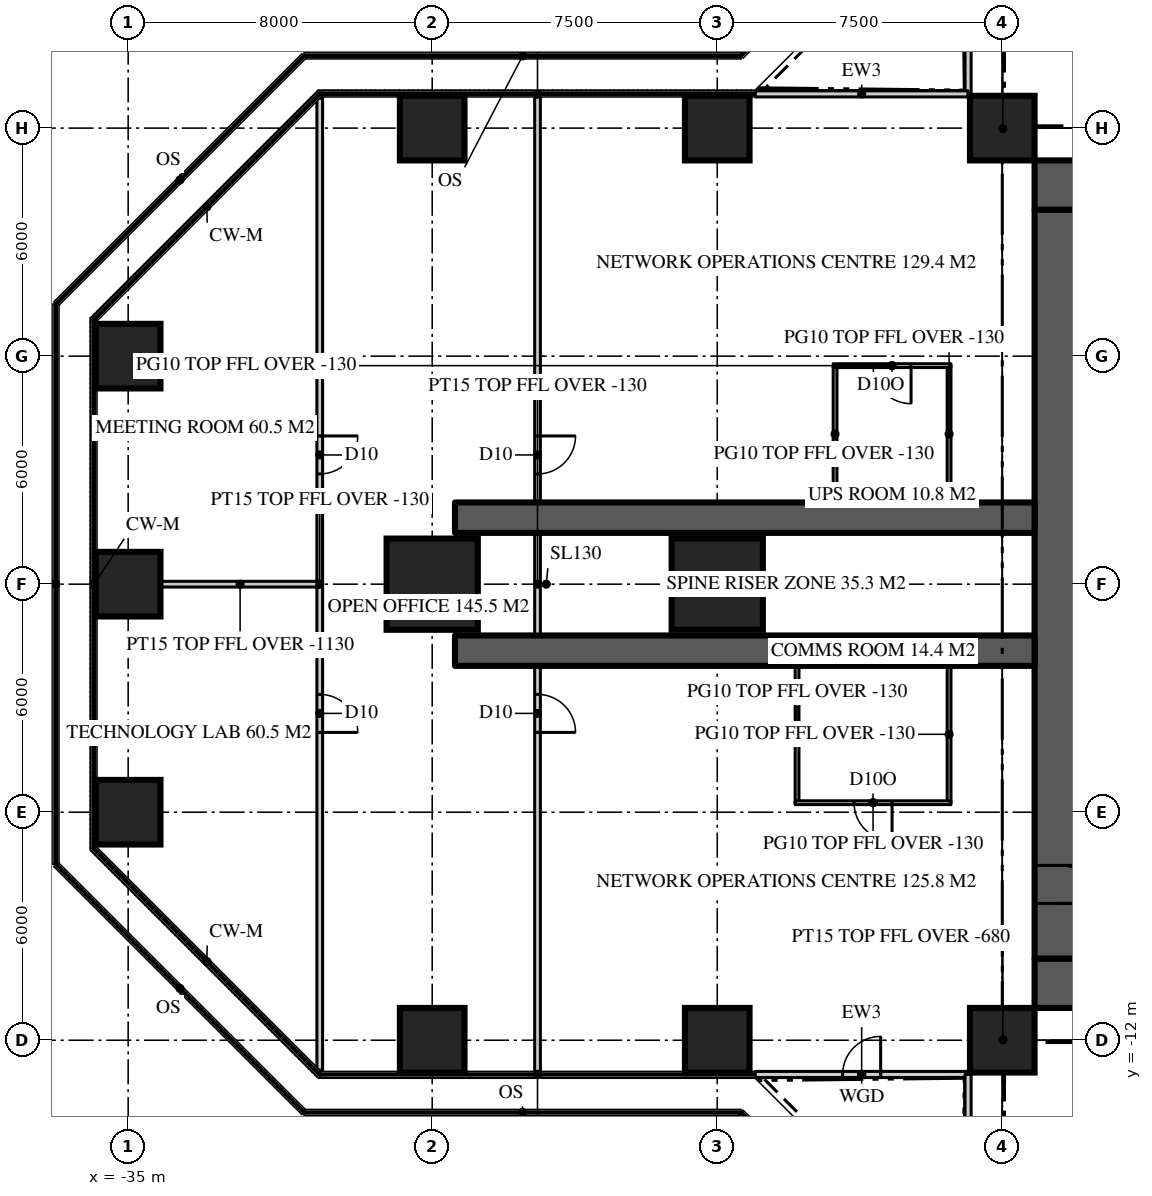
"""IFC4 building model, lengths in metres.
Left out: names, types, materials, properties, quantities, classifications, styles, units other than length and angle.
Written with IfcOpenShell. Run it as: python <this file> out.ifc"""

import sys

from ifc_helpers import new_model, si_unit, direction, frame, frame_2d, origin, origin_2d, place, context, subcontext, project, spatial, rectangle, extrude, element, fill, save


model = new_model("IFC4")
c1 = context("Model", 3, precision=1e-05, world=origin(), true_north=direction((0.0, 1.0)))
c2 = subcontext(c1, "Body", "Model", "MODEL_VIEW")
j1 = project(units=[si_unit("LENGTHUNIT", "METRE"), si_unit("PLANEANGLEUNIT", "RADIAN")], contexts=[c1])
p1 = place(None, origin())
s1 = spatial("IfcSite", under=j1, at=p1, CompositionType="ELEMENT")
p2 = place(p1, origin())
s2 = spatial("IfcBuilding", under=s1, at=p2, CompositionType="ELEMENT")
p3 = place(p2, frame((0.0, 0.0, 155.4)))
s3 = spatial("IfcBuildingStorey", under=s2, at=p3, CompositionType="ELEMENT", Elevation=155.4)
p4 = place(p3, frame((-11.15, 10.5, 0.0), z_axis=(0.0, 0.0, 1.0), x_axis=(1.0, 0.0, 0.0)))
e1 = element("IfcWall", 1, at=p4, inside=s3, PredefinedType="SHEAR", context=c2, shape_type="SweptSolid", body=[
    extrude(rectangle(XDim=22.3, YDim=1.3, at=frame_2d((11.15, 0.0))), origin(), (0.0, 0.0, 1.0), 3.9),
])
p5 = place(p4, frame((4.25, 0.0, 0.0)))
e2 = element("IfcOpeningElement", 2, at=p5, cuts=e1, PredefinedType="OPENING", context=c2, shape_type="SweptSolid", body=[
    extrude(rectangle(XDim=1.8, YDim=2.2, at=frame_2d((0.9, 1.1))), frame((0.0, 0.66, 0.0), z_axis=(0.0, -1.0, 0.0), x_axis=(1.0, 0.0, 0.0)), (0.0, 0.0, 1.0), 1.32),
])
p6 = place(p4, frame((16.25, 0.0, 0.0)))
e3 = element("IfcOpeningElement", 3, at=p6, cuts=e1, PredefinedType="OPENING", context=c2, shape_type="SweptSolid", body=[
    extrude(rectangle(XDim=1.8, YDim=2.2, at=frame_2d((0.9, 1.1))), frame((0.0, 0.66, 0.0), z_axis=(0.0, -1.0, 0.0), x_axis=(1.0, 0.0, 0.0)), (0.0, 0.0, 1.0), 1.32),
])
p7 = place(p3, frame((11.15, -10.5, 0.0), z_axis=(0.0, 0.0, 1.0), x_axis=(-1.0, 0.0, 0.0)))
e4 = element("IfcWall", 4, at=p7, inside=s3, PredefinedType="SHEAR", context=c2, shape_type="SweptSolid", body=[
    extrude(rectangle(XDim=22.3, YDim=1.3, at=frame_2d((11.15, 0.0))), origin(), (0.0, 0.0, 1.0), 3.9),
])
p8 = place(p7, frame((16.25, 0.0, 0.0)))
e5 = element("IfcOpeningElement", 5, at=p8, cuts=e4, PredefinedType="OPENING", context=c2, shape_type="SweptSolid", body=[
    extrude(rectangle(XDim=1.8, YDim=2.2, at=frame_2d((0.9, 1.1))), frame((0.0, 0.66, 0.0), z_axis=(0.0, -1.0, 0.0), x_axis=(1.0, 0.0, 0.0)), (0.0, 0.0, 1.0), 1.32),
])
p9 = place(p7, frame((4.25, 0.0, 0.0)))
e6 = element("IfcOpeningElement", 6, at=p9, cuts=e4, PredefinedType="OPENING", context=c2, shape_type="SweptSolid", body=[
    extrude(rectangle(XDim=1.8, YDim=2.2, at=frame_2d((0.9, 1.1))), frame((0.0, 0.66, 0.0), z_axis=(0.0, -1.0, 0.0), x_axis=(1.0, 0.0, 0.0)), (0.0, 0.0, 1.0), 1.32),
])
p10 = place(p3, frame((-10.5, 9.85, 0.0), z_axis=(0.0, 0.0, 1.0), x_axis=(0.0, -1.0, 0.0)))
e7 = element("IfcWall", 7, at=p10, inside=s3, PredefinedType="SHEAR", context=c2, shape_type="SweptSolid", body=[
    extrude(rectangle(XDim=19.7, YDim=1.3, at=frame_2d((9.85, 0.0))), origin(), (0.0, 0.0, 1.0), 3.9),
])
p11 = place(p10, frame((17.25, 0.0, 0.0)))
e8 = element("IfcOpeningElement", 8, at=p11, cuts=e7, PredefinedType="OPENING", context=c2, shape_type="SweptSolid", body=[
    extrude(rectangle(XDim=1.0, YDim=2.2, at=frame_2d((0.5, 1.1))), frame((0.0, 0.66, 0.0), z_axis=(0.0, -1.0, 0.0), x_axis=(1.0, 0.0, 0.0)), (0.0, 0.0, 1.0), 1.32),
])
for number, where, z_axis, x_axis in (
    (9, (-11.15, 1.75, 0.0), (0.0, 0.0, 1.0), (-1.0, 0.0, 0.0)),
    (10, (-11.15, -1.75, 0.0), (0.0, 0.0, 1.0), (-1.0, 0.0, 0.0)),
):
    element("IfcWall", number, at=place(p3, frame(where, z_axis=z_axis, x_axis=x_axis)), inside=s3, PredefinedType="SHEAR", context=c2, shape_type="SweptSolid", body=[
        extrude(rectangle(XDim=15.25, YDim=0.8, at=frame_2d((7.625, 0.0))), origin(), (0.0, 0.0, 1.0), 3.9),
    ])
for number, where, z_axis, x_axis in (
    (11, (-27.0, -12.0, 0.0), (0.0, 0.0, 1.0), (1.0, 0.0, 0.0)),
    (12, (-19.5, -12.0, 0.0), (0.0, 0.0, 1.0), (1.0, 0.0, 0.0)),
    (13, (-12.0, -12.0, 0.0), (0.0, 0.0, 1.0), (1.0, 0.0, 0.0)),
    (14, (-35.0, -6.0, 0.0), (0.0, 0.0, 1.0), (1.0, 0.0, 0.0)),
    (15, (-35.0, 0.0, 0.0), (0.0, 0.0, 1.0), (1.0, 0.0, 0.0)),
):
    element("IfcColumn", number, at=place(p3, frame(where, z_axis=z_axis, x_axis=x_axis)), inside=s3, PredefinedType="COLUMN", context=c2, shape_type="SweptSolid", body=[
        extrude(rectangle(XDim=1.7, YDim=1.7, at=origin_2d()), origin(), (0.0, 0.0, 1.0), 3.9),
    ])
for number, where, z_axis, x_axis in (
    (16, (-27.0, 0.0, 0.0), (0.0, 0.0, 1.0), (1.0, 0.0, 0.0)),
    (17, (-19.5, 0.0, 0.0), (0.0, 0.0, 1.0), (1.0, 0.0, 0.0)),
):
    element("IfcColumn", number, at=place(p3, frame(where, z_axis=z_axis, x_axis=x_axis)), inside=s3, PredefinedType="COLUMN", context=c2, shape_type="SweptSolid", body=[
        extrude(rectangle(XDim=2.4, YDim=2.4, at=origin_2d()), origin(), (0.0, 0.0, 1.0), 3.9),
    ])
for number, where, z_axis, x_axis in (
    (18, (-35.0, 6.0, 0.0), (0.0, 0.0, 1.0), (1.0, 0.0, 0.0)),
    (19, (-27.0, 12.0, 0.0), (0.0, 0.0, 1.0), (1.0, 0.0, 0.0)),
    (20, (-19.5, 12.0, 0.0), (0.0, 0.0, 1.0), (1.0, 0.0, 0.0)),
    (21, (-12.0, 12.0, 0.0), (0.0, 0.0, 1.0), (1.0, 0.0, 0.0)),
):
    element("IfcColumn", number, at=place(p3, frame(where, z_axis=z_axis, x_axis=x_axis)), inside=s3, PredefinedType="COLUMN", context=c2, shape_type="SweptSolid", body=[
        extrude(rectangle(XDim=1.7, YDim=1.7, at=origin_2d()), origin(), (0.0, 0.0, 1.0), 3.9),
    ])
p12 = place(p3, frame((-12.9, 18.5, 0.0), z_axis=(0.0, 0.0, 1.0), x_axis=(0.0, -1.0, 0.0)))
e22 = element("IfcWall", 22, at=p12, inside=s3, PredefinedType="SOLIDWALL", context=c2, shape_type="SweptSolid", body=[
    extrude(rectangle(XDim=5.6, YDim=0.16, at=frame_2d((2.8, 0.0))), origin(), (0.0, 0.0, 1.0), 3.77),
])
p13 = place(p12, frame((2.3, 0.0, 0.0)))
e23 = element("IfcOpeningElement", 23, at=p13, cuts=e22, PredefinedType="OPENING", context=c2, shape_type="SweptSolid", body=[
    extrude(rectangle(XDim=1.0, YDim=2.2, at=frame_2d((0.5, 1.1))), frame((0.0, 0.09, 0.0), z_axis=(0.0, -1.0, 0.0), x_axis=(1.0, 0.0, 0.0)), (0.0, 0.0, 1.0), 0.18),
])
p14 = place(p3, frame((-12.9, 12.9, 0.0), z_axis=(0.0, 0.0, 1.0), x_axis=(-1.0, 0.0, 0.0)))
e24 = element("IfcWall", 24, at=p14, inside=s3, PredefinedType="SOLIDWALL", context=c2, shape_type="SweptSolid", body=[
    extrude(rectangle(XDim=5.6, YDim=0.16, at=frame_2d((2.8, 0.0))), origin(), (0.0, 0.0, 1.0), 3.77),
])
p15 = place(p3, frame((-18.5, -12.9, 0.0), z_axis=(0.0, 0.0, 1.0), x_axis=(1.0, 0.0, 0.0)))
e25 = element("IfcWall", 25, at=p15, inside=s3, PredefinedType="SOLIDWALL", context=c2, shape_type="SweptSolid", body=[
    extrude(rectangle(XDim=5.6, YDim=0.16, at=frame_2d((2.8, 0.0))), origin(), (0.0, 0.0, 1.0), 3.77),
])
p16 = place(p15, frame((2.3, 0.0, 0.0)))
e26 = element("IfcOpeningElement", 26, at=p16, cuts=e25, PredefinedType="OPENING", context=c2, shape_type="SweptSolid", body=[
    extrude(rectangle(XDim=1.0, YDim=2.2, at=frame_2d((0.5, 1.1))), frame((0.0, 0.09, 0.0), z_axis=(0.0, -1.0, 0.0), x_axis=(1.0, 0.0, 0.0)), (0.0, 0.0, 1.0), 0.18),
])
p17 = place(p3, frame((-12.9, -12.9, 0.0), z_axis=(0.0, 0.0, 1.0), x_axis=(0.0, -1.0, 0.0)))
e27 = element("IfcWall", 27, at=p17, inside=s3, PredefinedType="SOLIDWALL", context=c2, shape_type="SweptSolid", body=[
    extrude(rectangle(XDim=5.6, YDim=0.16, at=frame_2d((2.8, 0.0))), origin(), (0.0, 0.0, 1.0), 3.77),
])
p18 = place(p3, frame((-24.229, 12.82, 0.0), z_axis=(0.0, 0.0, 1.0), x_axis=(0.0, -1.0, 0.0)))
e28 = element("IfcWall", 28, at=p18, inside=s3, PredefinedType="PARTITIONING", context=c2, shape_type="SweptSolid", body=[
    extrude(rectangle(XDim=25.64, YDim=0.15, at=frame_2d((12.82, 0.0))), origin(), (0.0, 0.0, 1.0), 3.77),
])
p19 = place(p18, frame((15.72, 0.0, 0.0)))
e29 = element("IfcOpeningElement", 29, at=p19, cuts=e28, PredefinedType="OPENING", context=c2, shape_type="SweptSolid", body=[
    extrude(rectangle(XDim=1.0, YDim=2.2, at=frame_2d((0.5, 1.1))), frame((0.0, 0.085, 0.0), z_axis=(0.0, -1.0, 0.0), x_axis=(1.0, 0.0, 0.0)), (0.0, 0.0, 1.0), 0.17),
])
p20 = place(p18, frame((8.92, 0.0, 0.0)))
e30 = element("IfcOpeningElement", 30, at=p20, cuts=e28, PredefinedType="OPENING", context=c2, shape_type="SweptSolid", body=[
    extrude(rectangle(XDim=1.0, YDim=2.2, at=frame_2d((0.5, 1.1))), frame((0.0, 0.085, 0.0), z_axis=(0.0, -1.0, 0.0), x_axis=(1.0, 0.0, 0.0)), (0.0, 0.0, 1.0), 0.17),
])
p21 = place(p3, frame((-29.959, 12.786, 0.0), z_axis=(0.0, 0.0, 1.0), x_axis=(0.0, -1.0, 0.0)))
e31 = element("IfcWall", 31, at=p21, inside=s3, PredefinedType="PARTITIONING", context=c2, shape_type="SweptSolid", body=[
    extrude(rectangle(XDim=25.573, YDim=0.15, at=frame_2d((12.786, 0.0))), origin(), (0.0, 0.0, 1.0), 3.77),
])
p22 = place(p21, frame((15.687, 0.0, 0.0)))
e32 = element("IfcOpeningElement", 32, at=p22, cuts=e31, PredefinedType="OPENING", context=c2, shape_type="SweptSolid", body=[
    extrude(rectangle(XDim=1.0, YDim=2.2, at=frame_2d((0.5, 1.1))), frame((0.0, 0.085, 0.0), z_axis=(0.0, -1.0, 0.0), x_axis=(1.0, 0.0, 0.0)), (0.0, 0.0, 1.0), 0.17),
])
p23 = place(p21, frame((8.886, 0.0, 0.0)))
e33 = element("IfcOpeningElement", 33, at=p23, cuts=e31, PredefinedType="OPENING", context=c2, shape_type="SweptSolid", body=[
    extrude(rectangle(XDim=1.0, YDim=2.2, at=frame_2d((0.5, 1.1))), frame((0.0, 0.085, 0.0), z_axis=(0.0, -1.0, 0.0), x_axis=(1.0, 0.0, 0.0)), (0.0, 0.0, 1.0), 0.17),
])
p24 = place(p3, frame((-29.959, 0.0, 0.0), z_axis=(0.0, 0.0, 1.0), x_axis=(-1.0, 0.0, 0.0)))
e34 = element("IfcWall", 34, at=p24, inside=s3, PredefinedType="PARTITIONING", context=c2, shape_type="SweptSolid", body=[
    extrude(rectangle(XDim=4.191, YDim=0.15, at=frame_2d((2.095, 0.0))), origin(), (0.0, 0.0, 1.0), 2.77),
])
for number, where, z_axis, x_axis in (
    (35, (-13.4, -2.15, 0.0), (0.0, 0.0, 1.0), (0.0, -1.0, 0.0)),
    (36, (-17.4, -2.15, 0.0), (0.0, 0.0, 1.0), (0.0, -1.0, 0.0)),
):
    element("IfcWall", number, at=place(p3, frame(where, z_axis=z_axis, x_axis=x_axis)), inside=s3, PredefinedType="PARTITIONING", context=c2, shape_type="SweptSolid", body=[
        extrude(rectangle(XDim=3.6, YDim=0.1, at=frame_2d((1.8, 0.0))), origin(), (0.0, 0.0, 1.0), 3.77),
    ])
p25 = place(p3, frame((-13.35, -5.75, 0.0), z_axis=(0.0, 0.0, 1.0), x_axis=(-1.0, 0.0, 0.0)))
e37 = element("IfcWall", 37, at=p25, inside=s3, PredefinedType="PARTITIONING", context=c2, shape_type="SweptSolid", body=[
    extrude(rectangle(XDim=4.1, YDim=0.1, at=frame_2d((2.05, 0.0))), origin(), (0.0, 0.0, 1.0), 3.77),
])
p26 = place(p25, frame((1.55, 0.0, 0.0)))
e38 = element("IfcOpeningElement", 38, at=p26, cuts=e37, PredefinedType="OPENING", context=c2, shape_type="SweptSolid", body=[
    extrude(rectangle(XDim=1.0, YDim=2.2, at=frame_2d((0.5, 1.1))), frame((0.0, 0.06, 0.0), z_axis=(0.0, -1.0, 0.0), x_axis=(1.0, 0.0, 0.0)), (0.0, 0.0, 1.0), 0.12),
])
for number, where, z_axis, x_axis in (
    (39, (-13.4, 2.15, 0.0), (0.0, 0.0, 1.0), (0.0, 1.0, 0.0)),
    (40, (-16.4, 2.15, 0.0), (0.0, 0.0, 1.0), (0.0, 1.0, 0.0)),
):
    element("IfcWall", number, at=place(p3, frame(where, z_axis=z_axis, x_axis=x_axis)), inside=s3, PredefinedType="PARTITIONING", context=c2, shape_type="SweptSolid", body=[
        extrude(rectangle(XDim=3.6, YDim=0.1, at=frame_2d((1.8, 0.0))), origin(), (0.0, 0.0, 1.0), 3.77),
    ])
p27 = place(p3, frame((-13.35, 5.75, 0.0), z_axis=(0.0, 0.0, 1.0), x_axis=(-1.0, 0.0, 0.0)))
e41 = element("IfcWall", 41, at=p27, inside=s3, PredefinedType="PARTITIONING", context=c2, shape_type="SweptSolid", body=[
    extrude(rectangle(XDim=3.1, YDim=0.1, at=frame_2d((1.55, 0.0))), origin(), (0.0, 0.0, 1.0), 3.77),
])
p28 = place(p27, frame((1.05, 0.0, 0.0)))
e42 = element("IfcOpeningElement", 42, at=p28, cuts=e41, PredefinedType="OPENING", context=c2, shape_type="SweptSolid", body=[
    extrude(rectangle(XDim=1.0, YDim=2.2, at=frame_2d((0.5, 1.1))), frame((0.0, 0.06, 0.0), z_axis=(0.0, -1.0, 0.0), x_axis=(1.0, 0.0, 0.0)), (0.0, 0.0, 1.0), 0.12),
])
for number, where, z_axis, x_axis in (
    (43, (-11.15, 11.15, 0.0), (0.0, 0.0, 1.0), (-0.707, 0.707, 0.0)),
    (44, (-11.15, -11.15, 0.0), (0.0, 0.0, 1.0), (-0.707, -0.707, 0.0)),
):
    element("IfcWall", number, at=place(p3, frame(where, z_axis=z_axis, x_axis=x_axis)), inside=s3, PredefinedType="PARTITIONING", context=c2, shape_type="SweptSolid", body=[
        extrude(rectangle(XDim=2.362, YDim=0.15, at=frame_2d((1.181, 0.0))), origin(), (0.0, 0.0, 1.0), 3.22),
    ])
p29 = place(p16, origin())
e45 = element("IfcDoor", 45, at=p29, inside=s3, OperationType="SINGLE_SWING_RIGHT", PredefinedType="DOOR", context=c2, shape_type="SweptSolid", body=[
    extrude(rectangle(XDim=1.0, YDim=2.2, at=frame_2d((0.5, 1.1))), frame((0.0, 0.025, 0.0), z_axis=(0.0, -1.0, 0.0), x_axis=(1.0, 0.0, 0.0)), (0.0, 0.0, 1.0), 0.05),
])
fill(e26, e45)
p30 = place(p11, origin())
e46 = element("IfcDoor", 46, at=p30, inside=s3, OperationType="SINGLE_SWING_RIGHT", PredefinedType="DOOR", context=c2, shape_type="SweptSolid", body=[
    extrude(rectangle(XDim=1.0, YDim=2.2, at=frame_2d((0.5, 1.1))), frame((0.0, 0.025, 0.0), z_axis=(0.0, -1.0, 0.0), x_axis=(1.0, 0.0, 0.0)), (0.0, 0.0, 1.0), 0.05),
])
fill(e8, e46)
p31 = place(p19, origin())
e47 = element("IfcDoor", 47, at=p31, inside=s3, OperationType="SINGLE_SWING_RIGHT", PredefinedType="DOOR", context=c2, shape_type="SweptSolid", body=[
    extrude(rectangle(XDim=1.0, YDim=2.2, at=frame_2d((0.5, 1.1))), frame((0.0, 0.025, 0.0), z_axis=(0.0, -1.0, 0.0), x_axis=(1.0, 0.0, 0.0)), (0.0, 0.0, 1.0), 0.05),
])
fill(e29, e47)
p32 = place(p20, origin())
e48 = element("IfcDoor", 48, at=p32, inside=s3, OperationType="SINGLE_SWING_LEFT", PredefinedType="DOOR", context=c2, shape_type="SweptSolid", body=[
    extrude(rectangle(XDim=1.0, YDim=2.2, at=frame_2d((0.5, 1.1))), frame((0.0, 0.025, 0.0), z_axis=(0.0, -1.0, 0.0), x_axis=(1.0, 0.0, 0.0)), (0.0, 0.0, 1.0), 0.05),
])
fill(e30, e48)
p33 = place(p22, origin())
e49 = element("IfcDoor", 49, at=p33, inside=s3, OperationType="SINGLE_SWING_RIGHT", PredefinedType="DOOR", context=c2, shape_type="SweptSolid", body=[
    extrude(rectangle(XDim=1.0, YDim=2.2, at=frame_2d((0.5, 1.1))), frame((0.0, 0.025, 0.0), z_axis=(0.0, -1.0, 0.0), x_axis=(1.0, 0.0, 0.0)), (0.0, 0.0, 1.0), 0.05),
])
fill(e32, e49)
p34 = place(p23, origin())
e50 = element("IfcDoor", 50, at=p34, inside=s3, OperationType="SINGLE_SWING_LEFT", PredefinedType="DOOR", context=c2, shape_type="SweptSolid", body=[
    extrude(rectangle(XDim=1.0, YDim=2.2, at=frame_2d((0.5, 1.1))), frame((0.0, 0.025, 0.0), z_axis=(0.0, -1.0, 0.0), x_axis=(1.0, 0.0, 0.0)), (0.0, 0.0, 1.0), 0.05),
])
fill(e33, e50)
p35 = place(p26, origin())
e51 = element("IfcDoor", 51, at=p35, inside=s3, OperationType="SINGLE_SWING_LEFT", PredefinedType="DOOR", context=c2, shape_type="SweptSolid", body=[
    extrude(rectangle(XDim=1.0, YDim=2.2, at=frame_2d((0.5, 1.1))), frame((0.0, 0.025, 0.0), z_axis=(0.0, -1.0, 0.0), x_axis=(1.0, 0.0, 0.0)), (0.0, 0.0, 1.0), 0.05),
])
fill(e38, e51)
p36 = place(p28, origin())
e52 = element("IfcDoor", 52, at=p36, inside=s3, OperationType="SINGLE_SWING_LEFT", PredefinedType="DOOR", context=c2, shape_type="SweptSolid", body=[
    extrude(rectangle(XDim=1.0, YDim=2.2, at=frame_2d((0.5, 1.1))), frame((0.0, 0.025, 0.0), z_axis=(0.0, -1.0, 0.0), x_axis=(1.0, 0.0, 0.0)), (0.0, 0.0, 1.0), 0.05),
])
fill(e42, e52)
save(model, sys.argv[1])
